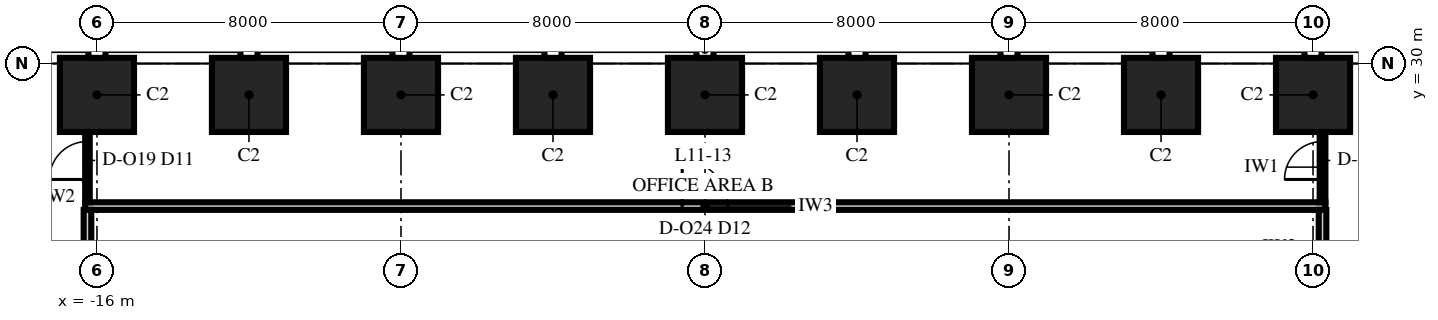
"""IFC4 building model, lengths in metres.
Left out: names, types, materials, properties, quantities, classifications, styles, units other than length and angle.
Written with IfcOpenShell. Run it as: python <this file> out.ifc"""

import sys

from ifc_helpers import new_model, si_unit, direction, frame, frame_2d, origin, origin_2d, place, context, subcontext, project, spatial, rectangle, extrude, element, fill, save


model = new_model("IFC4")
c1 = context("Model", 3, precision=1e-05, world=origin(), true_north=direction((0.0, 1.0)))
c2 = subcontext(c1, "Body", "Model", "MODEL_VIEW")
j1 = project(units=[si_unit("LENGTHUNIT", "METRE"), si_unit("PLANEANGLEUNIT", "RADIAN")], contexts=[c1])
p1 = place(None, origin())
s1 = spatial("IfcSite", under=j1, at=p1, CompositionType="ELEMENT")
p2 = place(p1, origin())
s2 = spatial("IfcBuilding", under=s1, at=p2, CompositionType="ELEMENT")
p3 = place(p2, frame((0.0, 0.0, 56.0)))
s3 = spatial("IfcBuildingStorey", under=s2, at=p3, CompositionType="ELEMENT", Elevation=56.0)
for number, where, z_axis, x_axis in (
    (1, (16.0, 29.175, 0.0), (0.0, 0.0, 1.0), (-1.0, 0.0, 0.0)),
    (2, (12.0, 29.175, 0.0), (0.0, 0.0, 1.0), (-1.0, 0.0, 0.0)),
    (3, (8.0, 29.175, 0.0), (0.0, 0.0, 1.0), (-1.0, 0.0, 0.0)),
    (4, (4.0, 29.175, 0.0), (0.0, 0.0, 1.0), (-1.0, 0.0, 0.0)),
    (5, (0.0, 29.175, 0.0), (0.0, 0.0, 1.0), (-1.0, 0.0, 0.0)),
    (6, (-4.0, 29.175, 0.0), (0.0, 0.0, 1.0), (-1.0, 0.0, 0.0)),
    (7, (-8.0, 29.175, 0.0), (0.0, 0.0, 1.0), (-1.0, 0.0, 0.0)),
    (8, (-12.0, 29.175, 0.0), (0.0, 0.0, 1.0), (-1.0, 0.0, 0.0)),
    (9, (-16.0, 29.175, 0.0), (0.0, 0.0, 1.0), (-1.0, 0.0, 0.0)),
):
    element("IfcColumn", number, at=place(p3, frame(where, z_axis=z_axis, x_axis=x_axis)), inside=s3, PredefinedType="COLUMN", context=c2, shape_type="SweptSolid", body=[
        extrude(rectangle(XDim=1.95, YDim=1.95, at=origin_2d()), origin(), (0.0, 0.0, 1.0), 4.0),
    ])
p4 = place(p3, frame((-16.31, 26.25, 0.0), z_axis=(0.0, 0.0, 1.0), x_axis=(1.0, 0.0, 0.0)))
e10 = element("IfcWall", 10, at=p4, inside=s3, PredefinedType="PARTITIONING", context=c2, shape_type="SweptSolid", body=[
    extrude(rectangle(XDim=32.635, YDim=0.2, at=frame_2d((16.317, 0.0))), origin(), (0.0, 0.0, 1.0), 3.4),
])
p5 = place(p4, frame((15.71, 0.0, 0.0)))
e11 = element("IfcOpeningElement", 11, at=p5, cuts=e10, PredefinedType="OPENING", context=c2, shape_type="SweptSolid", body=[
    extrude(rectangle(XDim=1.2, YDim=2.4, at=frame_2d((0.6, 1.2))), frame((0.0, 0.115, 0.0), z_axis=(0.0, -1.0, 0.0), x_axis=(1.0, 0.0, 0.0)), (0.0, 0.0, 1.0), 0.23),
])
p6 = place(p3, frame((-16.25, 3.85, 0.0), z_axis=(0.0, 0.0, 1.0), x_axis=(0.0, 1.0, 0.0)))
e12 = element("IfcWall", 12, at=p6, inside=s3, PredefinedType="PARTITIONING", context=c2, shape_type="SweptSolid", body=[
    extrude(rectangle(XDim=22.3, YDim=0.2, at=frame_2d((11.15, 0.0))), origin(), (0.0, 0.0, 1.0), 2.842),
])
p7 = place(p6, frame((4.55, 0.0, 0.0)))
e13 = element("IfcOpeningElement", 13, at=p7, cuts=e12, PredefinedType="OPENING", context=c2, shape_type="SweptSolid", body=[
    extrude(rectangle(XDim=1.2, YDim=2.4, at=frame_2d((0.6, 1.2))), frame((0.0, 0.115, 0.0), z_axis=(0.0, -1.0, 0.0), x_axis=(1.0, 0.0, 0.0)), (0.0, 0.0, 1.0), 0.23),
])
p8 = place(p3, frame((-16.25, 26.35, 0.0), z_axis=(0.0, 0.0, 1.0), x_axis=(0.0, 1.0, 0.0)))
e14 = element("IfcWall", 14, at=p8, inside=s3, PredefinedType="PARTITIONING", context=c2, shape_type="SweptSolid", body=[
    extrude(rectangle(XDim=1.85, YDim=0.12, at=frame_2d((0.925, 0.0))), origin(), (0.0, 0.0, 1.0), 3.85),
])
p9 = place(p8, frame((0.6, 0.0, 0.0)))
e15 = element("IfcOpeningElement", 15, at=p9, cuts=e14, PredefinedType="OPENING", context=c2, shape_type="SweptSolid", body=[
    extrude(rectangle(XDim=1.0, YDim=2.4, at=frame_2d((0.5, 1.2))), frame((0.0, 0.075, 0.0), z_axis=(0.0, -1.0, 0.0), x_axis=(1.0, 0.0, 0.0)), (0.0, 0.0, 1.0), 0.15),
])
p10 = place(p3, frame((16.25, 21.94, 0.0), z_axis=(0.0, 0.0, 1.0), x_axis=(0.0, 1.0, 0.0)))
e16 = element("IfcWall", 16, at=p10, inside=s3, PredefinedType="PARTITIONING", context=c2, shape_type="SweptSolid", body=[
    extrude(rectangle(XDim=4.21, YDim=0.2, at=frame_2d((2.105, 0.0))), origin(), (0.0, 0.0, 1.0), 3.4),
])
p11 = place(p3, frame((16.25, 26.35, 0.0), z_axis=(0.0, 0.0, 1.0), x_axis=(0.0, 1.0, 0.0)))
e17 = element("IfcWall", 17, at=p11, inside=s3, PredefinedType="PARTITIONING", context=c2, shape_type="SweptSolid", body=[
    extrude(rectangle(XDim=1.85, YDim=0.15, at=frame_2d((0.925, 0.0))), origin(), (0.0, 0.0, 1.0), 3.85),
])
p12 = place(p11, frame((0.6, 0.0, 0.0)))
e18 = element("IfcOpeningElement", 18, at=p12, cuts=e17, PredefinedType="OPENING", context=c2, shape_type="SweptSolid", body=[
    extrude(rectangle(XDim=1.0, YDim=2.3, at=frame_2d((0.5, 1.15))), frame((0.0, 0.09, 0.0), z_axis=(0.0, -1.0, 0.0), x_axis=(1.0, 0.0, 0.0)), (0.0, 0.0, 1.0), 0.18),
])
p13 = place(p9, origin())
e19 = element("IfcDoor", 19, at=p13, inside=s3, OperationType="SINGLE_SWING_RIGHT", PredefinedType="DOOR", context=c2, shape_type="SweptSolid", body=[
    extrude(rectangle(XDim=1.0, YDim=2.4, at=frame_2d((0.5, 1.2))), frame((0.0, 0.06, 0.0), z_axis=(0.0, -1.0, 0.0), x_axis=(1.0, 0.0, 0.0)), (0.0, 0.0, 1.0), 0.12),
])
fill(e15, e19)
p14 = place(p12, origin())
e20 = element("IfcDoor", 20, at=p14, inside=s3, OperationType="SINGLE_SWING_LEFT", PredefinedType="DOOR", context=c2, shape_type="SweptSolid", body=[
    extrude(rectangle(XDim=1.0, YDim=2.3, at=frame_2d((0.5, 1.15))), frame((0.0, 0.075, 0.0), z_axis=(0.0, -1.0, 0.0), x_axis=(1.0, 0.0, 0.0)), (0.0, 0.0, 1.0), 0.149),
])
fill(e18, e20)
p15 = place(p5, origin())
e21 = element("IfcDoor", 21, at=p15, inside=s3, OperationType="SINGLE_SWING_LEFT", PredefinedType="DOOR", context=c2, shape_type="SweptSolid", body=[
    extrude(rectangle(XDim=1.2, YDim=2.4, at=frame_2d((0.6, 1.2))), frame((0.0, 0.1, 0.0), z_axis=(0.0, -1.0, 0.0), x_axis=(1.0, 0.0, 0.0)), (0.0, 0.0, 1.0), 0.199),
])
fill(e11, e21)
save(model, sys.argv[1])
